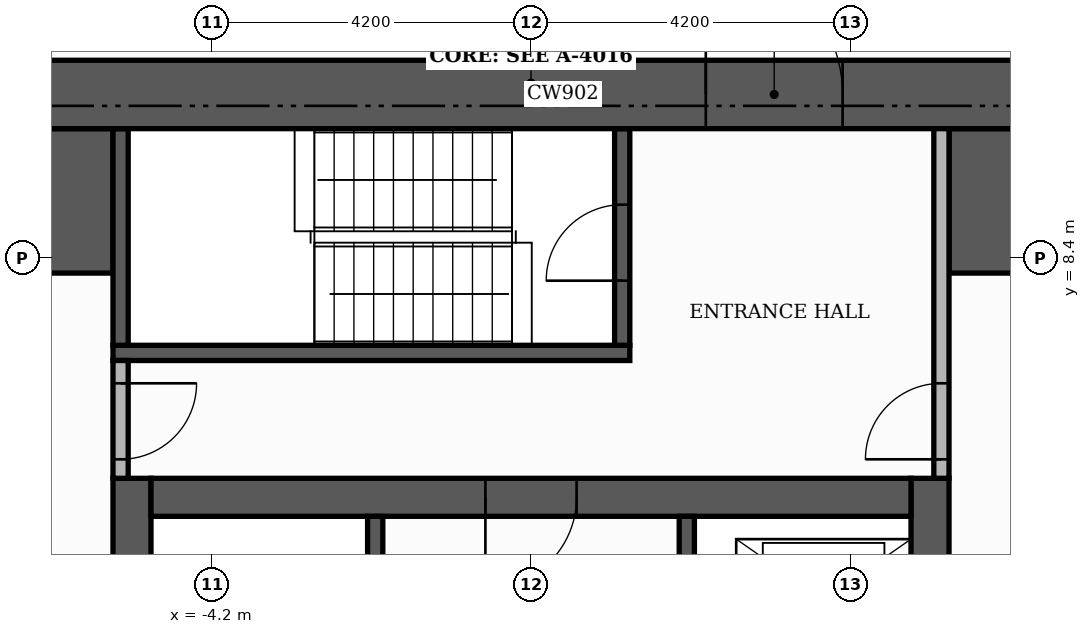
"""IFC4 building model, lengths in metres.
Left out: names, types, materials, properties, quantities, classifications, styles, units other than length and angle.
Written with IfcOpenShell. Run it as: python <this file> out.ifc"""

import sys

from ifc_helpers import new_model, si_unit, direction, frame, frame_2d, origin, place, context, subcontext, project, spatial, rectangle, extrude, element, fill, save


model = new_model("IFC4")
c1 = context("Model", 3, precision=1e-05, world=origin(), true_north=direction((0.0, 1.0)))
c2 = subcontext(c1, "Body", "Model", "MODEL_VIEW")
j1 = project(units=[si_unit("LENGTHUNIT", "METRE"), si_unit("PLANEANGLEUNIT", "RADIAN")], contexts=[c1])
p1 = place(None, origin())
s1 = spatial("IfcSite", under=j1, at=p1, CompositionType="ELEMENT")
p2 = place(p1, origin())
s2 = spatial("IfcBuilding", under=s1, at=p2, CompositionType="ELEMENT")
p3 = place(p2, frame((0.0, 0.0, 102.6)))
s3 = spatial("IfcBuildingStorey", under=s2, at=p3, CompositionType="ELEMENT", Elevation=102.6)
for number, where, z_axis, x_axis in (
    (1, (-5.25, -5.0, 0.0), (0.0, 0.0, 1.0), (0.0, 1.0, 0.0)),
    (2, (5.25, -5.0, 0.0), (0.0, 0.0, 1.0), (0.0, 1.0, 0.0)),
):
    element("IfcWall", number, at=place(p3, frame(where, z_axis=z_axis, x_axis=x_axis)), inside=s3, PredefinedType="SHEAR", context=c2, shape_type="SweptSolid", body=[
        extrude(rectangle(XDim=10.5, YDim=0.5, at=frame_2d((5.25, 0.0))), origin(), (0.0, 0.0, 1.0), 3.48),
    ])
p4 = place(p3, frame((-5.0, 5.25, 0.0), z_axis=(0.0, 0.0, 1.0), x_axis=(1.0, 0.0, 0.0)))
e3 = element("IfcWall", 3, at=p4, inside=s3, PredefinedType="SHEAR", context=c2, shape_type="SweptSolid", body=[
    extrude(rectangle(XDim=10.0, YDim=0.5, at=frame_2d((5.0, 0.0))), origin(), (0.0, 0.0, 1.0), 3.48),
])
p5 = place(p4, frame((4.4, 0.0, 0.0)))
e4 = element("IfcOpeningElement", 4, at=p5, cuts=e3, PredefinedType="OPENING", context=c2, shape_type="SweptSolid", body=[
    extrude(rectangle(XDim=1.2, YDim=2.1, at=frame_2d((0.6, 1.05))), frame((0.0, 0.26, 0.0), z_axis=(0.0, -1.0, 0.0), x_axis=(1.0, 0.0, 0.0)), (0.0, 0.0, 1.0), 0.52),
])
for number, where, z_axis, x_axis in (
    (5, (-10.1, 9.15, 0.0), (0.0, 0.0, 1.0), (1.0, 0.0, 0.0)),
    (6, (5.5, 9.15, 0.0), (0.0, 0.0, 1.0), (1.0, 0.0, 0.0)),
):
    element("IfcWall", number, at=place(p3, frame(where, z_axis=z_axis, x_axis=x_axis)), inside=s3, PredefinedType="SHEAR", context=c2, shape_type="SweptSolid", body=[
        extrude(rectangle(XDim=4.6, YDim=1.9, at=frame_2d((2.3, 0.0))), origin(), (0.0, 0.0, 1.0), 3.48),
    ])
p6 = place(p3, frame((-2.05, -1.4, 0.0), z_axis=(0.0, 0.0, 1.0), x_axis=(0.0, 1.0, 0.0)))
e7 = element("IfcWall", 7, at=p6, inside=s3, PredefinedType="SHEAR", context=c2, shape_type="SweptSolid", body=[
    extrude(rectangle(XDim=6.4, YDim=0.2, at=frame_2d((3.2, 0.0))), origin(), (0.0, 0.0, 1.0), 3.48),
])
p7 = place(p6, frame((0.15, 0.0, 0.0)))
e8 = element("IfcOpeningElement", 8, at=p7, cuts=e7, PredefinedType="OPENING", context=c2, shape_type="SweptSolid", body=[
    extrude(rectangle(XDim=1.0, YDim=2.1, at=frame_2d((0.5, 1.05))), frame((0.0, 0.11, 0.0), z_axis=(0.0, -1.0, 0.0), x_axis=(1.0, 0.0, 0.0)), (0.0, 0.0, 1.0), 0.22),
])
p8 = place(p3, frame((-5.5, 7.15, 0.0), z_axis=(0.0, 0.0, 1.0), x_axis=(1.0, 0.0, 0.0)))
e9 = element("IfcWall", 9, at=p8, inside=s3, PredefinedType="SHEAR", context=c2, shape_type="SweptSolid", body=[
    extrude(rectangle(XDim=6.8, YDim=0.2, at=frame_2d((3.4, 0.0))), origin(), (0.0, 0.0, 1.0), 3.48),
])
p9 = place(p3, frame((-5.4, 7.25, 0.0), z_axis=(0.0, 0.0, 1.0), x_axis=(0.0, 1.0, 0.0)))
e10 = element("IfcWall", 10, at=p9, inside=s3, PredefinedType="SHEAR", context=c2, shape_type="SweptSolid", body=[
    extrude(rectangle(XDim=2.85, YDim=0.2, at=frame_2d((1.425, 0.0))), origin(), (0.0, 0.0, 1.0), 3.48),
])
p10 = place(p3, frame((1.2, 7.25, 0.0), z_axis=(0.0, 0.0, 1.0), x_axis=(0.0, 1.0, 0.0)))
e11 = element("IfcWall", 11, at=p10, inside=s3, PredefinedType="SHEAR", context=c2, shape_type="SweptSolid", body=[
    extrude(rectangle(XDim=2.85, YDim=0.2, at=frame_2d((1.425, 0.0))), origin(), (0.0, 0.0, 1.0), 3.48),
])
p11 = place(p10, frame((0.85, 0.0, 0.0)))
e12 = element("IfcOpeningElement", 12, at=p11, cuts=e11, PredefinedType="OPENING", context=c2, shape_type="SweptSolid", body=[
    extrude(rectangle(XDim=1.0, YDim=2.1, at=frame_2d((0.5, 1.05))), frame((0.0, 0.11, 0.0), z_axis=(0.0, -1.0, 0.0), x_axis=(1.0, 0.0, 0.0)), (0.0, 0.0, 1.0), 0.22),
])
p12 = place(p3, frame((2.05, 1.6, 0.0), z_axis=(0.0, 0.0, 1.0), x_axis=(0.0, 1.0, 0.0)))
e13 = element("IfcWall", 13, at=p12, inside=s3, PredefinedType="SHEAR", context=c2, shape_type="SweptSolid", body=[
    extrude(rectangle(XDim=3.4, YDim=0.2, at=frame_2d((1.7, 0.0))), origin(), (0.0, 0.0, 1.0), 3.48),
])
p13 = place(p12, frame((1.75, 0.0, 0.0)))
e14 = element("IfcOpeningElement", 14, at=p13, cuts=e13, PredefinedType="OPENING", context=c2, shape_type="SweptSolid", body=[
    extrude(rectangle(XDim=1.1, YDim=2.1, at=frame_2d((0.55, 1.05))), frame((0.0, 0.11, 0.0), z_axis=(0.0, -1.0, 0.0), x_axis=(1.0, 0.0, 0.0)), (0.0, 0.0, 1.0), 0.22),
])
p14 = place(p12, frame((0.15, 0.0, 0.0)))
e15 = element("IfcOpeningElement", 15, at=p14, cuts=e13, PredefinedType="OPENING", context=c2, shape_type="SweptSolid", body=[
    extrude(rectangle(XDim=0.8, YDim=2.1, at=frame_2d((0.4, 1.05))), frame((0.0, 0.11, 0.0), z_axis=(0.0, -1.0, 0.0), x_axis=(1.0, 0.0, 0.0)), (0.0, 0.0, 1.0), 0.22),
])
p15 = place(p3, frame((-11.0, 10.55, 0.0), z_axis=(0.0, 0.0, 1.0), x_axis=(1.0, 0.0, 0.0)))
e16 = element("IfcWall", 16, at=p15, inside=s3, PredefinedType="SHEAR", context=c2, shape_type="SweptSolid", body=[
    extrude(rectangle(XDim=22.0, YDim=0.9, at=frame_2d((11.0, 0.0))), origin(), (0.0, 0.0, 1.0), 3.48),
])
p16 = place(p15, frame((13.3, 0.0, 0.0)))
e17 = element("IfcOpeningElement", 17, at=p16, cuts=e16, PredefinedType="OPENING", context=c2, shape_type="SweptSolid", body=[
    extrude(rectangle(XDim=1.8, YDim=2.2, at=frame_2d((0.9, 1.1))), frame((0.0, 0.46, 0.0), z_axis=(0.0, -1.0, 0.0), x_axis=(1.0, 0.0, 0.0)), (0.0, 0.0, 1.0), 0.92),
])
p17 = place(p3, frame((-5.4, 5.5, 0.0), z_axis=(0.0, 0.0, 1.0), x_axis=(0.0, 1.0, 0.0)))
e18 = element("IfcWall", 18, at=p17, inside=s3, PredefinedType="PARTITIONING", context=c2, shape_type="SweptSolid", body=[
    extrude(rectangle(XDim=1.55, YDim=0.2, at=frame_2d((0.775, 0.0))), origin(), (0.0, 0.0, 1.0), 3.48),
])
p18 = place(p17, frame((0.25, 0.0, 0.0)))
e19 = element("IfcOpeningElement", 19, at=p18, cuts=e18, PredefinedType="OPENING", context=c2, shape_type="SweptSolid", body=[
    extrude(rectangle(XDim=1.0, YDim=2.1, at=frame_2d((0.5, 1.05))), frame((0.0, 0.11, 0.0), z_axis=(0.0, -1.0, 0.0), x_axis=(1.0, 0.0, 0.0)), (0.0, 0.0, 1.0), 0.22),
])
p19 = place(p3, frame((5.4, 5.5, 0.0), z_axis=(0.0, 0.0, 1.0), x_axis=(0.0, 1.0, 0.0)))
e20 = element("IfcWall", 20, at=p19, inside=s3, PredefinedType="PARTITIONING", context=c2, shape_type="SweptSolid", body=[
    extrude(rectangle(XDim=4.6, YDim=0.2, at=frame_2d((2.3, 0.0))), origin(), (0.0, 0.0, 1.0), 3.48),
])
p20 = place(p19, frame((0.25, 0.0, 0.0)))
e21 = element("IfcOpeningElement", 21, at=p20, cuts=e20, PredefinedType="OPENING", context=c2, shape_type="SweptSolid", body=[
    extrude(rectangle(XDim=1.0, YDim=2.1, at=frame_2d((0.5, 1.05))), frame((0.0, 0.11, 0.0), z_axis=(0.0, -1.0, 0.0), x_axis=(1.0, 0.0, 0.0)), (0.0, 0.0, 1.0), 0.22),
])
p21 = place(p5, frame((1.2, 0.0, 0.0), z_axis=(0.0, 0.0, 1.0), x_axis=(-1.0, 0.0, 0.0)))
e22 = element("IfcDoor", 22, at=p21, inside=s3, OperationType="SINGLE_SWING_LEFT", PredefinedType="DOOR", context=c2, shape_type="SweptSolid", body=[
    extrude(rectangle(XDim=1.2, YDim=2.1, at=frame_2d((0.6, 1.05))), frame((0.0, 0.025, 0.0), z_axis=(0.0, -1.0, 0.0), x_axis=(1.0, 0.0, 0.0)), (0.0, 0.0, 1.0), 0.05),
])
fill(e4, e22)
p22 = place(p11, origin())
e23 = element("IfcDoor", 23, at=p22, inside=s3, OperationType="SINGLE_SWING_LEFT", PredefinedType="DOOR", context=c2, shape_type="SweptSolid", body=[
    extrude(rectangle(XDim=1.0, YDim=2.1, at=frame_2d((0.5, 1.05))), frame((0.0, 0.025, 0.0), z_axis=(0.0, -1.0, 0.0), x_axis=(1.0, 0.0, 0.0)), (0.0, 0.0, 1.0), 0.05),
])
fill(e12, e23)
p23 = place(p18, frame((1.0, 0.0, 0.0), z_axis=(0.0, 0.0, 1.0), x_axis=(-1.0, 0.0, 0.0)))
e24 = element("IfcDoor", 24, at=p23, inside=s3, OperationType="SINGLE_SWING_RIGHT", PredefinedType="DOOR", context=c2, shape_type="SweptSolid", body=[
    extrude(rectangle(XDim=1.0, YDim=2.1, at=frame_2d((0.5, 1.05))), frame((0.0, 0.025, 0.0), z_axis=(0.0, -1.0, 0.0), x_axis=(1.0, 0.0, 0.0)), (0.0, 0.0, 1.0), 0.05),
])
fill(e19, e24)
p24 = place(p20, origin())
e25 = element("IfcDoor", 25, at=p24, inside=s3, OperationType="SINGLE_SWING_LEFT", PredefinedType="DOOR", context=c2, shape_type="SweptSolid", body=[
    extrude(rectangle(XDim=1.0, YDim=2.1, at=frame_2d((0.5, 1.05))), frame((0.0, 0.025, 0.0), z_axis=(0.0, -1.0, 0.0), x_axis=(1.0, 0.0, 0.0)), (0.0, 0.0, 1.0), 0.05),
])
fill(e21, e25)
p25 = place(p16, origin())
e26 = element("IfcDoor", 26, at=p25, inside=s3, OperationType="DOUBLE_DOOR_SINGLE_SWING", PredefinedType="DOOR", context=c2, shape_type="SweptSolid", body=[
    extrude(rectangle(XDim=1.8, YDim=2.2, at=frame_2d((0.9, 1.1))), frame((0.0, 0.025, 0.0), z_axis=(0.0, -1.0, 0.0), x_axis=(1.0, 0.0, 0.0)), (0.0, 0.0, 1.0), 0.05),
])
fill(e17, e26)
save(model, sys.argv[1])
